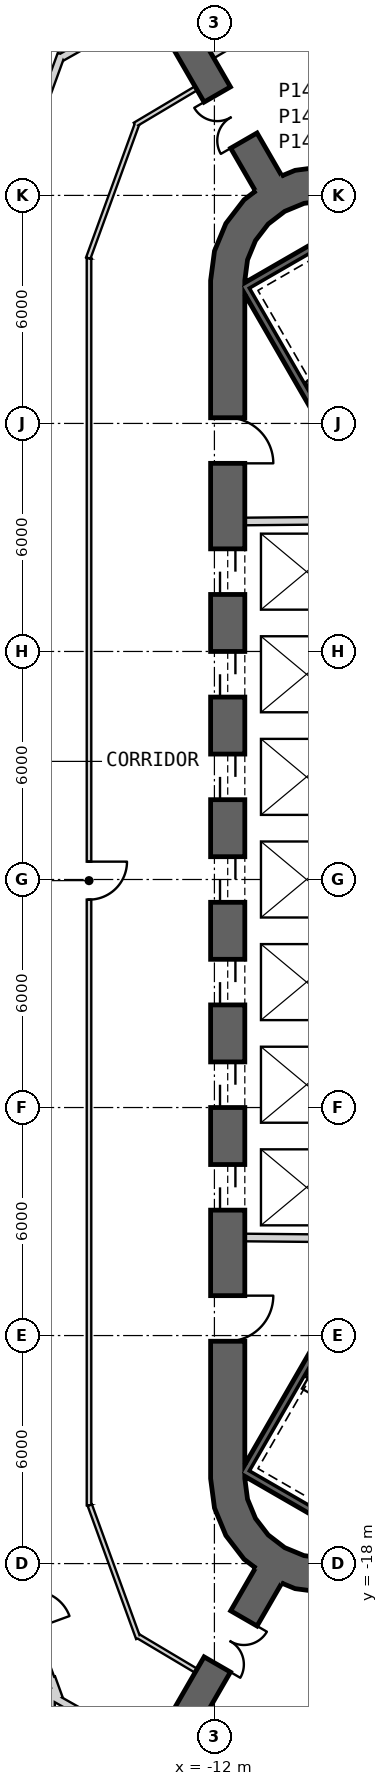
"""IFC4 building model, lengths in metres.
Left out: names, types, materials, properties, quantities, classifications, styles, units other than length and angle.
Written with IfcOpenShell. Run it as: python <this file> out.ifc"""

import sys

from ifc_helpers import new_model, si_unit, direction, frame, frame_2d, origin, place, context, subcontext, project, spatial, polyline, rectangle, outline, extrude, element, fill, save


model = new_model("IFC4")
c1 = context("Model", 3, precision=1e-05, world=origin(), true_north=direction((0.0, 1.0)))
c2 = subcontext(c1, "Body", "Model", "MODEL_VIEW")
j1 = project(units=[si_unit("LENGTHUNIT", "METRE"), si_unit("PLANEANGLEUNIT", "RADIAN")], contexts=[c1])
p1 = place(None, origin())
s1 = spatial("IfcSite", under=j1, at=p1, CompositionType="ELEMENT")
p2 = place(p1, origin())
s2 = spatial("IfcBuilding", under=s1, at=p2, CompositionType="ELEMENT")
p3 = place(p2, frame((0.0, 0.0, 131.6)))
s3 = spatial("IfcBuildingStorey", under=s2, at=p3, CompositionType="ELEMENT", Elevation=131.6)
p4 = place(p3, frame((-11.65, 15.762, 0.0), z_axis=(0.0, 0.0, 1.0), x_axis=(0.0, -1.0, 0.0)))
e1 = element("IfcWall", 1, at=p4, inside=s3, PredefinedType="SHEAR", context=c2, shape_type="SweptSolid", body=[
    extrude(rectangle(XDim=31.523, YDim=0.9, at=frame_2d((15.762, 0.0))), origin(), (0.0, 0.0, 1.0), 4.1),
])
p5 = place(p4, frame((7.062, 0.0, 0.0)))
e2 = element("IfcOpeningElement", 2, at=p5, cuts=e1, PredefinedType="OPENING", context=c2, shape_type="SweptSolid", body=[
    extrude(rectangle(XDim=1.2, YDim=2.4, at=frame_2d((0.6, 1.2))), frame((0.0, 0.46, 0.0), z_axis=(0.0, -1.0, 0.0), x_axis=(1.0, 0.0, 0.0)), (0.0, 0.0, 1.0), 0.92),
])
p6 = place(p4, frame((9.762, 0.0, 0.0)))
e3 = element("IfcOpeningElement", 3, at=p6, cuts=e1, PredefinedType="OPENING", context=c2, shape_type="SweptSolid", body=[
    extrude(rectangle(XDim=1.2, YDim=2.4, at=frame_2d((0.6, 1.2))), frame((0.0, 0.46, 0.0), z_axis=(0.0, -1.0, 0.0), x_axis=(1.0, 0.0, 0.0)), (0.0, 0.0, 1.0), 0.92),
])
p7 = place(p4, frame((12.462, 0.0, 0.0)))
e4 = element("IfcOpeningElement", 4, at=p7, cuts=e1, PredefinedType="OPENING", context=c2, shape_type="SweptSolid", body=[
    extrude(rectangle(XDim=1.2, YDim=2.4, at=frame_2d((0.6, 1.2))), frame((0.0, 0.46, 0.0), z_axis=(0.0, -1.0, 0.0), x_axis=(1.0, 0.0, 0.0)), (0.0, 0.0, 1.0), 0.92),
])
p8 = place(p4, frame((15.162, 0.0, 0.0)))
e5 = element("IfcOpeningElement", 5, at=p8, cuts=e1, PredefinedType="OPENING", context=c2, shape_type="SweptSolid", body=[
    extrude(rectangle(XDim=1.2, YDim=2.4, at=frame_2d((0.6, 1.2))), frame((0.0, 0.46, 0.0), z_axis=(0.0, -1.0, 0.0), x_axis=(1.0, 0.0, 0.0)), (0.0, 0.0, 1.0), 0.92),
])
p9 = place(p4, frame((17.862, 0.0, 0.0)))
e6 = element("IfcOpeningElement", 6, at=p9, cuts=e1, PredefinedType="OPENING", context=c2, shape_type="SweptSolid", body=[
    extrude(rectangle(XDim=1.2, YDim=2.4, at=frame_2d((0.6, 1.2))), frame((0.0, 0.46, 0.0), z_axis=(0.0, -1.0, 0.0), x_axis=(1.0, 0.0, 0.0)), (0.0, 0.0, 1.0), 0.92),
])
p10 = place(p4, frame((20.562, 0.0, 0.0)))
e7 = element("IfcOpeningElement", 7, at=p10, cuts=e1, PredefinedType="OPENING", context=c2, shape_type="SweptSolid", body=[
    extrude(rectangle(XDim=1.2, YDim=2.4, at=frame_2d((0.6, 1.2))), frame((0.0, 0.46, 0.0), z_axis=(0.0, -1.0, 0.0), x_axis=(1.0, 0.0, 0.0)), (0.0, 0.0, 1.0), 0.92),
])
p11 = place(p4, frame((23.262, 0.0, 0.0)))
e8 = element("IfcOpeningElement", 8, at=p11, cuts=e1, PredefinedType="OPENING", context=c2, shape_type="SweptSolid", body=[
    extrude(rectangle(XDim=1.2, YDim=2.4, at=frame_2d((0.6, 1.2))), frame((0.0, 0.46, 0.0), z_axis=(0.0, -1.0, 0.0), x_axis=(1.0, 0.0, 0.0)), (0.0, 0.0, 1.0), 0.92),
])
p12 = place(p4, frame((3.612, 0.0, 0.0)))
e9 = element("IfcOpeningElement", 9, at=p12, cuts=e1, PredefinedType="OPENING", context=c2, shape_type="SweptSolid", body=[
    extrude(rectangle(XDim=1.2, YDim=2.4, at=frame_2d((0.6, 1.2))), frame((0.0, 0.46, 0.0), z_axis=(0.0, -1.0, 0.0), x_axis=(1.0, 0.0, 0.0)), (0.0, 0.0, 1.0), 0.92),
])
p13 = place(p4, frame((26.712, 0.0, 0.0)))
e10 = element("IfcOpeningElement", 10, at=p13, cuts=e1, PredefinedType="OPENING", context=c2, shape_type="SweptSolid", body=[
    extrude(rectangle(XDim=1.2, YDim=2.4, at=frame_2d((0.6, 1.2))), frame((0.0, 0.46, 0.0), z_axis=(0.0, -1.0, 0.0), x_axis=(1.0, 0.0, 0.0)), (0.0, 0.0, 1.0), 0.92),
])
p14 = place(p3, origin())
e11 = element("IfcWall", 11, at=p14, inside=s3, PredefinedType="SHEAR", context=c2, shape_type="SweptSolid", body=[
    extrude(outline(polyline([(-7.6, 18.36), (-8.323, 18.659), (-9.1, 18.762), (-9.876, 18.659), (-10.6, 18.36), (-11.221, 17.883), (-11.698, 17.262), (-11.998, 16.538), (-12.1, 15.762), (-11.2, 15.762), (-11.128, 16.305), (-10.919, 16.812), (-10.585, 17.247), (-10.15, 17.58), (-9.644, 17.79), (-9.1, 17.862), (-8.556, 17.79), (-8.05, 17.58), (-7.6, 18.36)])), origin(), (0.0, 0.0, 1.0), 4.1),
])
p15 = place(p3, origin())
e12 = element("IfcWall", 12, at=p15, inside=s3, PredefinedType="SHEAR", context=c2, shape_type="SweptSolid", body=[
    extrude(outline(polyline([(-12.1, -15.762), (-11.998, -16.538), (-11.698, -17.262), (-11.221, -17.883), (-10.6, -18.36), (-9.876, -18.659), (-9.1, -18.762), (-8.323, -18.659), (-7.6, -18.36), (-8.05, -17.58), (-8.556, -17.79), (-9.1, -17.862), (-9.644, -17.79), (-10.15, -17.58), (-10.585, -17.247), (-10.919, -16.812), (-11.128, -16.305), (-11.2, -15.762), (-12.1, -15.762)])), origin(), (0.0, 0.0, 1.0), 4.1),
])
p16 = place(p3, frame((-10.575, 18.316, 0.0), z_axis=(0.0, 0.0, 1.0), x_axis=(-0.500005394759, 0.866022289097, 0.0)))
e13 = element("IfcWall", 13, at=p16, inside=s3, PredefinedType="SHEAR", context=c2, shape_type="SweptSolid", body=[
    extrude(rectangle(XDim=12.598, YDim=0.8, at=frame_2d((6.299, 0.0))), origin(), (0.0, 0.0, 1.0), 4.1),
])
p17 = place(p16, frame((1.3, 0.0, 0.0)))
e14 = element("IfcOpeningElement", 14, at=p17, cuts=e13, PredefinedType="OPENING", context=c2, shape_type="SweptSolid", body=[
    extrude(rectangle(XDim=1.4, YDim=2.4, at=frame_2d((0.7, 1.2))), frame((0.0, 0.41, 0.0), z_axis=(0.0, -1.0, 0.0), x_axis=(1.0, 0.0, 0.0)), (0.0, 0.0, 1.0), 0.82),
])
p18 = place(p3, frame((-10.575, -18.316, 0.0), z_axis=(0.0, 0.0, 1.0), x_axis=(-0.500005394759, -0.866022289097, 0.0)))
e15 = element("IfcWall", 15, at=p18, inside=s3, PredefinedType="SHEAR", context=c2, shape_type="SweptSolid", body=[
    extrude(rectangle(XDim=12.598, YDim=0.8, at=frame_2d((6.299, 0.0))), origin(), (0.0, 0.0, 1.0), 4.1),
])
p19 = place(p18, frame((1.3, 0.0, 0.0)))
e16 = element("IfcOpeningElement", 16, at=p19, cuts=e15, PredefinedType="OPENING", context=c2, shape_type="SweptSolid", body=[
    extrude(rectangle(XDim=1.4, YDim=2.4, at=frame_2d((0.7, 1.2))), frame((0.0, 0.41, 0.0), z_axis=(0.0, -1.0, 0.0), x_axis=(1.0, 0.0, 0.0)), (0.0, 0.0, 1.0), 0.82),
])
p20 = place(p3, frame((-11.2, 9.42, 0.0), z_axis=(0.0, 0.0, 1.0), x_axis=(0.999957167047, 0.009255488683, 0.0)))
e17 = element("IfcWall", 17, at=p20, inside=s3, PredefinedType="PLUMBINGWALL", context=c2, shape_type="SweptSolid", body=[
    extrude(rectangle(XDim=3.35, YDim=0.2, at=frame_2d((1.675, 0.0))), origin(), (0.0, 0.0, 1.0), 3.8),
])
p21 = place(p3, frame((-8.05, -9.449, 0.0), z_axis=(0.0, 0.0, 1.0), x_axis=(-0.999957467379, 0.009222983926, 0.0)))
e18 = element("IfcWall", 18, at=p21, inside=s3, PredefinedType="PLUMBINGWALL", context=c2, shape_type="SweptSolid", body=[
    extrude(rectangle(XDim=3.15, YDim=0.2, at=frame_2d((1.575, 0.0))), origin(), (0.0, 0.0, 1.0), 3.8),
])
p22 = place(p3, frame((-11.245, 15.678, -0.3), z_axis=(0.0, 0.0, 1.0), x_axis=(0.499977274689, -0.866038523851, 0.0)))
e19 = element("IfcWall", 19, at=p22, inside=s3, PredefinedType="SHEAR", context=c2, shape_type="SweptSolid", body=[
    extrude(rectangle(XDim=8.1, YDim=0.2, at=frame_2d((4.05, 0.0))), origin(), (0.0, 0.0, 1.0), 4.1),
])
for number, where, z_axis, x_axis in (
    (20, (-7.818, 17.541, -0.3), (0.0, 0.0, 1.0), (-0.866, -0.5, 0.0)),
    (21, (-11.282, -15.541, -0.3), (0.0, 0.0, 1.0), (0.866, -0.5, 0.0)),
):
    element("IfcWall", number, at=place(p3, frame(where, z_axis=z_axis, x_axis=x_axis)), inside=s3, PredefinedType="SHEAR", context=c2, shape_type="SweptSolid", body=[
        extrude(rectangle(XDim=3.8, YDim=0.2, at=frame_2d((1.9, 0.0))), origin(), (0.0, 0.0, 1.0), 4.1),
    ])
p23 = place(p3, frame((-7.196, -8.663, -0.3), z_axis=(0.0, 0.0, 1.0), x_axis=(-0.499997992926, -0.866026562566, 0.0)))
e22 = element("IfcWall", 22, at=p23, inside=s3, PredefinedType="SHEAR", context=c2, shape_type="SweptSolid", body=[
    extrude(rectangle(XDim=7.9, YDim=0.2, at=frame_2d((3.95, 0.0))), origin(), (0.0, 0.0, 1.0), 4.1),
])
p24 = place(p3, frame((-12.482, 20.819, 0.0), z_axis=(0.0, 0.0, 1.0), x_axis=(-0.85913200524, -0.511754040113, 0.0)))
e23 = element("IfcWall", 23, at=p24, inside=s3, PredefinedType="PARTITIONING", context=c2, shape_type="SweptSolid", body=[
    extrude(rectangle(XDim=1.875, YDim=0.12, at=frame_2d((0.937, 0.0))), origin(), (0.0, 0.0, 1.0), 3.8),
])
p25 = place(p3, frame((-14.038, 19.872, 0.0), z_axis=(0.0, 0.0, 1.0), x_axis=(-0.342035870777, -0.939686896313, 0.0)))
e24 = element("IfcWall", 24, at=p25, inside=s3, PredefinedType="PARTITIONING", context=c2, shape_type="SweptSolid", body=[
    extrude(rectangle(XDim=3.749, YDim=0.12, at=frame_2d((1.875, 0.0))), origin(), (0.0, 0.0, 1.0), 2.88),
])
p26 = place(p3, frame((-15.3, 16.345, 0.0), z_axis=(0.0, 0.0, 1.0), x_axis=(0.0, -1.0, 0.0)))
e25 = element("IfcWall", 25, at=p26, inside=s3, PredefinedType="PARTITIONING", context=c2, shape_type="SweptSolid", body=[
    extrude(rectangle(XDim=32.811, YDim=0.12, at=frame_2d((16.405, 0.0))), origin(), (0.0, 0.0, 1.0), 2.98),
])
p27 = place(p26, frame((15.875, 0.0, 0.0)))
e26 = element("IfcOpeningElement", 26, at=p27, cuts=e25, PredefinedType="OPENING", context=c2, shape_type="SweptSolid", body=[
    extrude(rectangle(XDim=1.0, YDim=2.1, at=frame_2d((0.5, 1.05))), frame((0.0, 0.07, 0.0), z_axis=(0.0, -1.0, 0.0), x_axis=(1.0, 0.0, 0.0)), (0.0, 0.0, 1.0), 0.14),
])
p28 = place(p3, frame((-15.28, -16.462, 0.0), z_axis=(0.0, 0.0, 1.0), x_axis=(0.34206888523, -0.939674878752, 0.0)))
e27 = element("IfcWall", 27, at=p28, inside=s3, PredefinedType="PARTITIONING", context=c2, shape_type="SweptSolid", body=[
    extrude(rectangle(XDim=3.73, YDim=0.12, at=frame_2d((1.865, 0.0))), origin(), (0.0, 0.0, 1.0), 2.88),
])
p29 = place(p3, frame((-14.005, -19.912, 0.0), z_axis=(0.0, 0.0, 1.0), x_axis=(0.859128591272, -0.511759771435, 0.0)))
e28 = element("IfcWall", 28, at=p29, inside=s3, PredefinedType="PARTITIONING", context=c2, shape_type="SweptSolid", body=[
    extrude(rectangle(XDim=1.773, YDim=0.12, at=frame_2d((0.887, 0.0))), origin(), (0.0, 0.0, 1.0), 3.8),
])
p30 = place(p3, frame((-16.027, 21.718, 0.0), z_axis=(0.0, 0.0, 1.0), x_axis=(-0.342039923135, -0.939685421288, 0.0)))
e29 = element("IfcWall", 29, at=p30, inside=s3, PredefinedType="PARTITIONING", context=c2, shape_type="SweptSolid", body=[
    extrude(rectangle(XDim=5.084, YDim=0.2, at=frame_2d((2.542, 0.0))), origin(), (0.0, 0.0, 1.0), 2.88),
])
p31 = place(p3, frame((-13.707, 22.94, 0.0), z_axis=(0.0, 0.0, 1.0), x_axis=(-0.870827475384, -0.491588759143, 0.0)))
e30 = element("IfcWall", 30, at=p31, inside=s3, PredefinedType="PARTITIONING", context=c2, shape_type="SweptSolid", body=[
    extrude(rectangle(XDim=2.662, YDim=0.2, at=frame_2d((1.331, 0.0))), origin(), (0.0, 0.0, 1.0), 3.8),
])
p32 = place(p3, frame((-16.2, -21.532, 0.0), z_axis=(0.0, 0.0, 1.0), x_axis=(0.870802525435, -0.491632954241, 0.0)))
e31 = element("IfcWall", 31, at=p32, inside=s3, PredefinedType="PARTITIONING", context=c2, shape_type="SweptSolid", body=[
    extrude(rectangle(XDim=2.863, YDim=0.2, at=frame_2d((1.432, 0.0))), origin(), (0.0, 0.0, 1.0), 3.8),
])
p33 = place(p3, frame((-16.288, -21.001, 0.0), z_axis=(0.0, 0.0, 1.0), x_axis=(0.342137351889, -0.939649952079, 0.0)))
e32 = element("IfcWall", 32, at=p33, inside=s3, PredefinedType="PARTITIONING", context=c2, shape_type="SweptSolid", body=[
    extrude(rectangle(XDim=0.596, YDim=0.2, at=frame_2d((0.298, 0.0))), origin(), (0.0, 0.0, 1.0), 2.88),
])
p34 = place(p3, frame((-17.561, -17.503, 0.0), z_axis=(0.0, 0.0, 1.0), x_axis=(0.342022140343, -0.939691893929, 0.0)))
e33 = element("IfcWall", 33, at=p34, inside=s3, PredefinedType="PLUMBINGWALL", context=c2, shape_type="SweptSolid", body=[
    extrude(rectangle(XDim=3.723, YDim=0.15, at=frame_2d((1.861, 0.0))), origin(), (0.0, 0.0, 1.0), 2.88),
])
p35 = place(p34, frame((1.361, 0.0, 0.0)))
e34 = element("IfcOpeningElement", 34, at=p35, cuts=e33, PredefinedType="OPENING", context=c2, shape_type="SweptSolid", body=[
    extrude(rectangle(XDim=1.0, YDim=2.1, at=frame_2d((0.5, 1.05))), frame((0.0, 0.085, 0.0), z_axis=(0.0, -1.0, 0.0), x_axis=(1.0, 0.0, 0.0)), (0.0, 0.0, 1.0), 0.17),
])
p36 = place(p3, frame((-10.228, 22.786, 0.0), z_axis=(0.0, 0.0, 1.0), x_axis=(-0.859754348804, -0.510707802674, 0.0)))
e35 = element("IfcWall", 35, at=p36, inside=s3, PredefinedType="PARTITIONING", context=c2, shape_type="SweptSolid", body=[
    extrude(rectangle(XDim=2.135, YDim=0.2, at=frame_2d((1.068, 0.0))), origin(), (0.0, 0.0, 1.0), 3.8),
])
p37 = place(p3, frame((-16.3, -26.04, 0.0), z_axis=(0.0, 0.0, 1.0), x_axis=(0.0, 1.0, 0.0)))
e36 = element("IfcWall", 36, at=p37, inside=s3, PredefinedType="PARTITIONING", context=c2, shape_type="SweptSolid", body=[
    extrude(rectangle(XDim=4.78, YDim=0.2, at=frame_2d((2.39, 0.0))), origin(), (0.0, 0.0, 1.0), 2.88),
])
p38 = place(p27, origin())
e37 = element("IfcDoor", 37, at=p38, inside=s3, OperationType="SINGLE_SWING_LEFT", PredefinedType="NOTDEFINED", context=c2, shape_type="SweptSolid", body=[
    extrude(rectangle(XDim=1.0, YDim=2.1, at=frame_2d((0.5, 1.05))), frame((0.0, 0.025, 0.0), z_axis=(0.0, -1.0, 0.0), x_axis=(1.0, 0.0, 0.0)), (0.0, 0.0, 1.0), 0.05),
])
fill(e26, e37)
p39 = place(p5, origin())
e38 = element("IfcDoor", 38, at=p39, inside=s3, OperationType="SLIDING_TO_LEFT", PredefinedType="USERDEFINED", context=c2, shape_type="SweptSolid", body=[
    extrude(rectangle(XDim=1.2, YDim=2.4, at=frame_2d((0.6, 1.2))), frame((0.0, 0.025, 0.0), z_axis=(0.0, -1.0, 0.0), x_axis=(1.0, 0.0, 0.0)), (0.0, 0.0, 1.0), 0.05),
])
fill(e2, e38)
p40 = place(p6, origin())
e39 = element("IfcDoor", 39, at=p40, inside=s3, OperationType="SLIDING_TO_LEFT", PredefinedType="USERDEFINED", context=c2, shape_type="SweptSolid", body=[
    extrude(rectangle(XDim=1.2, YDim=2.4, at=frame_2d((0.6, 1.2))), frame((0.0, 0.025, 0.0), z_axis=(0.0, -1.0, 0.0), x_axis=(1.0, 0.0, 0.0)), (0.0, 0.0, 1.0), 0.05),
])
fill(e3, e39)
p41 = place(p7, origin())
e40 = element("IfcDoor", 40, at=p41, inside=s3, OperationType="SLIDING_TO_LEFT", PredefinedType="USERDEFINED", context=c2, shape_type="SweptSolid", body=[
    extrude(rectangle(XDim=1.2, YDim=2.4, at=frame_2d((0.6, 1.2))), frame((0.0, 0.025, 0.0), z_axis=(0.0, -1.0, 0.0), x_axis=(1.0, 0.0, 0.0)), (0.0, 0.0, 1.0), 0.05),
])
fill(e4, e40)
p42 = place(p8, origin())
e41 = element("IfcDoor", 41, at=p42, inside=s3, OperationType="SLIDING_TO_LEFT", PredefinedType="USERDEFINED", context=c2, shape_type="SweptSolid", body=[
    extrude(rectangle(XDim=1.2, YDim=2.4, at=frame_2d((0.6, 1.2))), frame((0.0, 0.025, 0.0), z_axis=(0.0, -1.0, 0.0), x_axis=(1.0, 0.0, 0.0)), (0.0, 0.0, 1.0), 0.05),
])
fill(e5, e41)
p43 = place(p9, origin())
e42 = element("IfcDoor", 42, at=p43, inside=s3, OperationType="SLIDING_TO_LEFT", PredefinedType="USERDEFINED", context=c2, shape_type="SweptSolid", body=[
    extrude(rectangle(XDim=1.2, YDim=2.4, at=frame_2d((0.6, 1.2))), frame((0.0, 0.025, 0.0), z_axis=(0.0, -1.0, 0.0), x_axis=(1.0, 0.0, 0.0)), (0.0, 0.0, 1.0), 0.05),
])
fill(e6, e42)
p44 = place(p10, origin())
e43 = element("IfcDoor", 43, at=p44, inside=s3, OperationType="SLIDING_TO_LEFT", PredefinedType="USERDEFINED", context=c2, shape_type="SweptSolid", body=[
    extrude(rectangle(XDim=1.2, YDim=2.4, at=frame_2d((0.6, 1.2))), frame((0.0, 0.025, 0.0), z_axis=(0.0, -1.0, 0.0), x_axis=(1.0, 0.0, 0.0)), (0.0, 0.0, 1.0), 0.05),
])
fill(e7, e43)
p45 = place(p11, origin())
e44 = element("IfcDoor", 44, at=p45, inside=s3, OperationType="SLIDING_TO_LEFT", PredefinedType="USERDEFINED", context=c2, shape_type="SweptSolid", body=[
    extrude(rectangle(XDim=1.2, YDim=2.4, at=frame_2d((0.6, 1.2))), frame((0.0, 0.025, 0.0), z_axis=(0.0, -1.0, 0.0), x_axis=(1.0, 0.0, 0.0)), (0.0, 0.0, 1.0), 0.05),
])
fill(e8, e44)
p46 = place(p12, origin())
e45 = element("IfcDoor", 45, at=p46, inside=s3, OperationType="SINGLE_SWING_LEFT", PredefinedType="USERDEFINED", context=c2, shape_type="SweptSolid", body=[
    extrude(rectangle(XDim=1.2, YDim=2.4, at=frame_2d((0.6, 1.2))), frame((0.0, 0.025, 0.0), z_axis=(0.0, -1.0, 0.0), x_axis=(1.0, 0.0, 0.0)), (0.0, 0.0, 1.0), 0.05),
])
fill(e9, e45)
p47 = place(p13, origin())
e46 = element("IfcDoor", 46, at=p47, inside=s3, OperationType="SINGLE_SWING_LEFT", PredefinedType="USERDEFINED", context=c2, shape_type="SweptSolid", body=[
    extrude(rectangle(XDim=1.2, YDim=2.4, at=frame_2d((0.6, 1.2))), frame((0.0, 0.025, 0.0), z_axis=(0.0, -1.0, 0.0), x_axis=(1.0, 0.0, 0.0)), (0.0, 0.0, 1.0), 0.05),
])
fill(e10, e46)
p48 = place(p17, origin())
e47 = element("IfcDoor", 47, at=p48, inside=s3, OperationType="DOUBLE_DOOR_SINGLE_SWING", PredefinedType="NOTDEFINED", context=c2, shape_type="SweptSolid", body=[
    extrude(rectangle(XDim=1.4, YDim=2.4, at=frame_2d((0.7, 1.2))), frame((0.0, 0.025, 0.0), z_axis=(0.0, -1.0, 0.0), x_axis=(1.0, 0.0, 0.0)), (0.0, 0.0, 1.0), 0.05),
])
fill(e14, e47)
p49 = place(p19, origin())
e48 = element("IfcDoor", 48, at=p49, inside=s3, OperationType="DOUBLE_DOOR_SINGLE_SWING", PredefinedType="NOTDEFINED", context=c2, shape_type="SweptSolid", body=[
    extrude(rectangle(XDim=1.4, YDim=2.4, at=frame_2d((0.7, 1.2))), frame((0.0, 0.025, 0.0), z_axis=(0.0, -1.0, 0.0), x_axis=(1.0, 0.0, 0.0)), (0.0, 0.0, 1.0), 0.05),
])
fill(e16, e48)
save(model, sys.argv[1])
